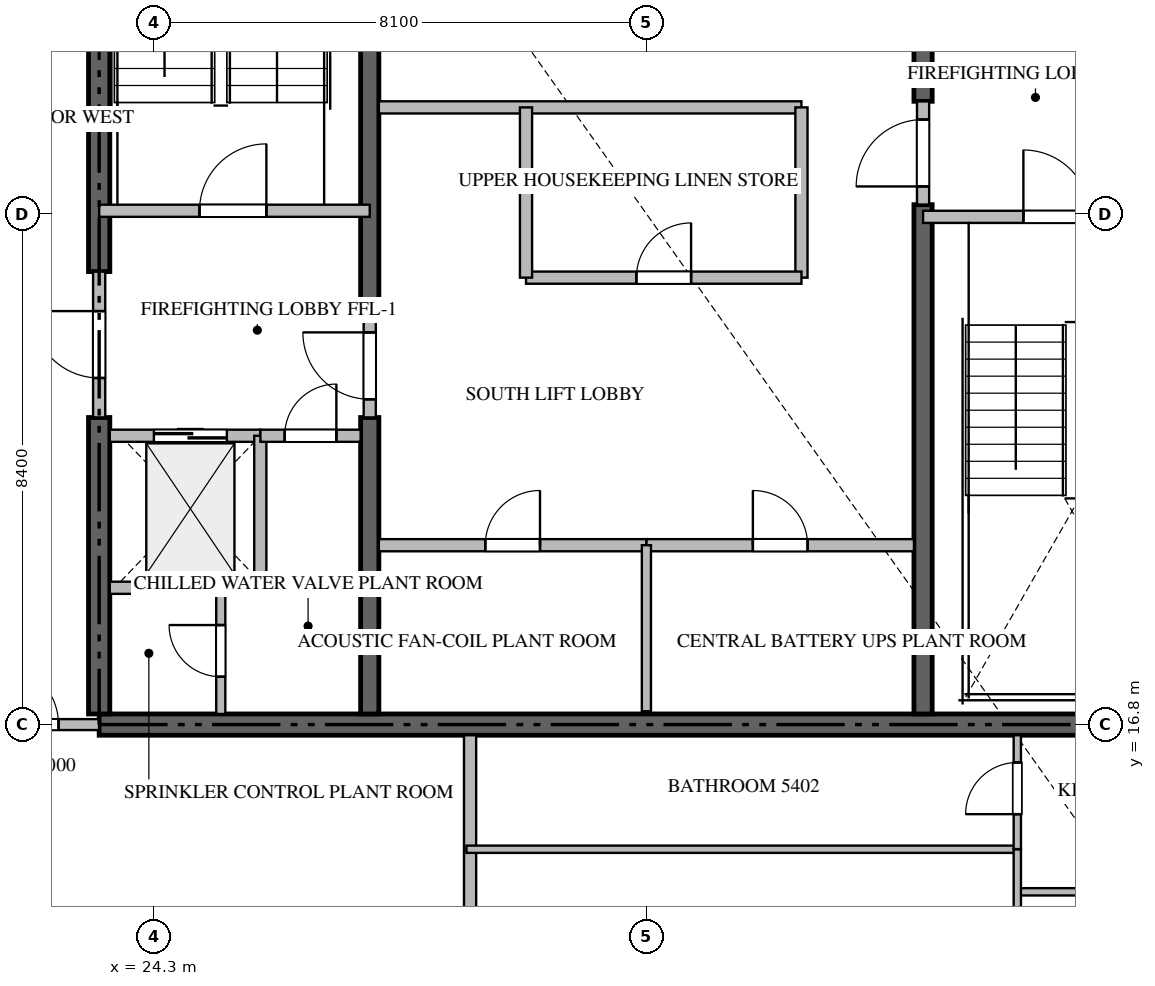
"""IFC4 building model, lengths in metres.
Left out: names, types, materials, properties, quantities, classifications, styles, units other than length and angle.
Written with IfcOpenShell. Run it as: python <this file> out.ifc"""

import sys

from ifc_helpers import new_model, si_unit, direction, frame, frame_2d, origin, place, context, subcontext, project, spatial, rectangle, extrude, source, transform, mapped, element, fill, save


model = new_model("IFC4")
c1 = context("Model", 3, precision=1e-05, world=origin(), true_north=direction((0.0, 1.0)))
c2 = subcontext(c1, "Body", "Model", "MODEL_VIEW")
j1 = project(units=[si_unit("LENGTHUNIT", "METRE"), si_unit("PLANEANGLEUNIT", "RADIAN")], contexts=[c1])
p1 = place(None, origin())
s1 = spatial("IfcSite", under=j1, at=p1, CompositionType="ELEMENT")
p2 = place(p1, origin())
s2 = spatial("IfcBuilding", under=s1, at=p2, CompositionType="ELEMENT")
p3 = place(p2, frame((0.0, 0.0, 218.15)))
s3 = spatial("IfcBuildingStorey", under=s2, at=p3, CompositionType="ELEMENT", Elevation=218.15)
p4 = place(p3, frame((23.4, 16.8, -0.26), z_axis=(0.0, 0.0, 1.0), x_axis=(1.0, 0.0, 0.0)))
e1 = element("IfcWall", 1, at=p4, inside=s3, PredefinedType="SHEAR", context=c2, shape_type="SweptSolid", body=[
    extrude(rectangle(XDim=18.0, YDim=0.35, at=frame_2d((9.0, 0.0))), origin(), (0.0, 0.0, 1.0), 3.848),
])
p5 = place(p3, frame((23.4, 16.975, -0.26), z_axis=(0.0, 0.0, 1.0), x_axis=(0.0, 1.0, 0.0)))
e2 = element("IfcWall", 2, at=p5, inside=s3, PredefinedType="SHEAR", context=c2, shape_type="SweptSolid", body=[
    extrude(rectangle(XDim=4.875, YDim=0.35, at=frame_2d((2.438, 0.0))), origin(), (0.0, 0.0, 1.0), 3.848),
])
p6 = place(p3, frame((23.4, 24.25, -0.26), z_axis=(0.0, 0.0, 1.0), x_axis=(0.0, 1.0, 0.0)))
e3 = element("IfcWall", 3, at=p6, inside=s3, PredefinedType="SHEAR", context=c2, shape_type="SweptSolid", body=[
    extrude(rectangle(XDim=9.175, YDim=0.35, at=frame_2d((4.587, 0.0))), origin(), (0.0, 0.0, 1.0), 3.848),
])
p7 = place(p3, frame((27.85, 16.975, -0.26), z_axis=(0.0, 0.0, 1.0), x_axis=(0.0, 1.0, 0.0)))
e4 = element("IfcWall", 4, at=p7, inside=s3, PredefinedType="SHEAR", context=c2, shape_type="SweptSolid", body=[
    extrude(rectangle(XDim=4.875, YDim=0.3, at=frame_2d((2.438, 0.0))), origin(), (0.0, 0.0, 1.0), 3.848),
])
p8 = place(p3, frame((27.85, 23.55, -0.26), z_axis=(0.0, 0.0, 1.0), x_axis=(0.0, 1.0, 0.0)))
e5 = element("IfcWall", 5, at=p8, inside=s3, PredefinedType="SHEAR", context=c2, shape_type="SweptSolid", body=[
    extrude(rectangle(XDim=9.875, YDim=0.3, at=frame_2d((4.938, 0.0))), origin(), (0.0, 0.0, 1.0), 3.848),
])
p9 = place(p3, frame((36.95, 16.975, -0.26), z_axis=(0.0, 0.0, 1.0), x_axis=(0.0, 1.0, 0.0)))
e6 = element("IfcWall", 6, at=p9, inside=s3, PredefinedType="SHEAR", context=c2, shape_type="SweptSolid", body=[
    extrude(rectangle(XDim=8.375, YDim=0.3, at=frame_2d((4.188, 0.0))), origin(), (0.0, 0.0, 1.0), 3.848),
])
p10 = place(p3, frame((36.95, 27.05, -0.26), z_axis=(0.0, 0.0, 1.0), x_axis=(0.0, 1.0, 0.0)))
e7 = element("IfcWall", 7, at=p10, inside=s3, PredefinedType="SHEAR", context=c2, shape_type="SweptSolid", body=[
    extrude(rectangle(XDim=6.375, YDim=0.3, at=frame_2d((3.188, 0.0))), origin(), (0.0, 0.0, 1.0), 3.848),
])
p11 = place(p3, frame((23.4, 25.25, 0.0), z_axis=(0.0, 0.0, 1.0), x_axis=(1.0, 0.0, 0.0)))
e8 = element("IfcWall", 8, at=p11, inside=s3, PredefinedType="STANDARD", context=c2, shape_type="SweptSolid", body=[
    extrude(rectangle(XDim=4.45, YDim=0.2, at=frame_2d((2.225, 0.0))), origin(), (0.0, 0.0, 1.0), 3.59),
])
p12 = place(p11, frame((1.65, 0.0, 0.0)))
e9 = element("IfcOpeningElement", 9, at=p12, cuts=e8, PredefinedType="OPENING", context=c2, shape_type="SweptSolid", body=[
    extrude(rectangle(XDim=1.1, YDim=2.15, at=frame_2d((0.55, 1.075))), frame((0.0, 0.11, 0.0), z_axis=(0.0, -1.0, 0.0), x_axis=(1.0, 0.0, 0.0)), (0.0, 0.0, 1.0), 0.22),
])
p13 = place(p3, frame((36.95, 25.15, 0.0), z_axis=(0.0, 0.0, 1.0), x_axis=(1.0, 0.0, 0.0)))
e10 = element("IfcWall", 10, at=p13, inside=s3, PredefinedType="STANDARD", context=c2, shape_type="SweptSolid", body=[
    extrude(rectangle(XDim=4.45, YDim=0.2, at=frame_2d((2.225, 0.0))), origin(), (0.0, 0.0, 1.0), 3.59),
])
p14 = place(p13, frame((1.65, 0.0, 0.0)))
e11 = element("IfcOpeningElement", 11, at=p14, cuts=e10, PredefinedType="OPENING", context=c2, shape_type="SweptSolid", body=[
    extrude(rectangle(XDim=1.1, YDim=2.15, at=frame_2d((0.55, 1.075))), frame((0.0, 0.11, 0.0), z_axis=(0.0, -1.0, 0.0), x_axis=(1.0, 0.0, 0.0)), (0.0, 0.0, 1.0), 0.22),
])
p15 = place(p3, frame((23.575, 21.55, 0.0), z_axis=(0.0, 0.0, 1.0), x_axis=(1.0, 0.0, 0.0)))
e12 = element("IfcWall", 12, at=p15, inside=s3, PredefinedType="STANDARD", context=c2, shape_type="SweptSolid", body=[
    extrude(rectangle(XDim=2.475, YDim=0.2, at=frame_2d((1.238, 0.0))), origin(), (0.0, 0.0, 1.0), 3.59),
])
p16 = place(p15, frame((0.725, 0.0, 0.0)))
e13 = element("IfcOpeningElement", 13, at=p16, cuts=e12, PredefinedType="OPENING", context=c2, shape_type="SweptSolid", body=[
    extrude(rectangle(XDim=1.2, YDim=2.2, at=frame_2d((0.6, 1.1))), frame((0.0, 0.11, 0.0), z_axis=(0.0, -1.0, 0.0), x_axis=(1.0, 0.0, 0.0)), (0.0, 0.0, 1.0), 0.22),
])
p17 = place(p3, frame((26.05, 19.05, 0.0), z_axis=(0.0, 0.0, 1.0), x_axis=(0.0, 1.0, 0.0)))
e14 = element("IfcWall", 14, at=p17, inside=s3, PredefinedType="STANDARD", context=c2, shape_type="SweptSolid", body=[
    extrude(rectangle(XDim=2.5, YDim=0.2, at=frame_2d((1.25, 0.0))), origin(), (0.0, 0.0, 1.0), 3.59),
])
p18 = place(p3, frame((23.575, 19.05, 0.0), z_axis=(0.0, 0.0, 1.0), x_axis=(1.0, 0.0, 0.0)))
e15 = element("IfcWall", 15, at=p18, inside=s3, PredefinedType="STANDARD", context=c2, shape_type="SweptSolid", body=[
    extrude(rectangle(XDim=2.475, YDim=0.2, at=frame_2d((1.238, 0.0))), origin(), (0.0, 0.0, 1.0), 3.59),
])
p19 = place(p3, frame((26.052, 21.55, 0.0), z_axis=(0.0, 0.0, 1.0), x_axis=(1.0, 0.0, 0.0)))
e16 = element("IfcWall", 16, at=p19, inside=s3, PredefinedType="STANDARD", context=c2, shape_type="SweptSolid", body=[
    extrude(rectangle(XDim=1.648, YDim=0.2, at=frame_2d((0.824, 0.0))), origin(), (0.0, 0.0, 1.0), 3.59),
])
p20 = place(p19, frame((0.399, 0.0, 0.0)))
e17 = element("IfcOpeningElement", 17, at=p20, cuts=e16, PredefinedType="OPENING", context=c2, shape_type="SweptSolid", body=[
    extrude(rectangle(XDim=0.85, YDim=2.1, at=frame_2d((0.425, 1.05))), frame((0.0, 0.11, 0.0), z_axis=(0.0, -1.0, 0.0), x_axis=(1.0, 0.0, 0.0)), (0.0, 0.0, 1.0), 0.22),
])
p21 = place(p3, frame((23.4, 21.852, 0.0), z_axis=(0.0, 0.0, 1.0), x_axis=(0.0, 1.0, 0.0)))
e18 = element("IfcWall", 18, at=p21, inside=s3, PredefinedType="STANDARD", context=c2, shape_type="SweptSolid", body=[
    extrude(rectangle(XDim=2.396, YDim=0.2, at=frame_2d((1.198, 0.0))), origin(), (0.0, 0.0, 1.0), 3.59),
])
p22 = place(p21, frame((0.648, 0.0, 0.0)))
e19 = element("IfcOpeningElement", 19, at=p22, cuts=e18, PredefinedType="OPENING", context=c2, shape_type="SweptSolid", body=[
    extrude(rectangle(XDim=1.1, YDim=2.15, at=frame_2d((0.55, 1.075))), frame((0.0, 0.11, 0.0), z_axis=(0.0, -1.0, 0.0), x_axis=(1.0, 0.0, 0.0)), (0.0, 0.0, 1.0), 0.22),
])
p23 = place(p3, frame((27.85, 21.852, 0.0), z_axis=(0.0, 0.0, 1.0), x_axis=(0.0, 1.0, 0.0)))
e20 = element("IfcWall", 20, at=p23, inside=s3, PredefinedType="STANDARD", context=c2, shape_type="SweptSolid", body=[
    extrude(rectangle(XDim=1.696, YDim=0.2, at=frame_2d((0.848, 0.0))), origin(), (0.0, 0.0, 1.0), 3.59),
])
p24 = place(p23, frame((0.298, 0.0, 0.0)))
e21 = element("IfcOpeningElement", 21, at=p24, cuts=e20, PredefinedType="OPENING", context=c2, shape_type="SweptSolid", body=[
    extrude(rectangle(XDim=1.1, YDim=2.15, at=frame_2d((0.55, 1.075))), frame((0.0, 0.11, 0.0), z_axis=(0.0, -1.0, 0.0), x_axis=(1.0, 0.0, 0.0)), (0.0, 0.0, 1.0), 0.22),
])
p25 = place(p3, frame((36.95, 25.352, 0.0), z_axis=(0.0, 0.0, 1.0), x_axis=(0.0, 1.0, 0.0)))
e22 = element("IfcWall", 22, at=p25, inside=s3, PredefinedType="STANDARD", context=c2, shape_type="SweptSolid", body=[
    extrude(rectangle(XDim=1.696, YDim=0.2, at=frame_2d((0.848, 0.0))), origin(), (0.0, 0.0, 1.0), 3.59),
])
p26 = place(p25, frame((0.298, 0.0, 0.0)))
e23 = element("IfcOpeningElement", 23, at=p26, cuts=e22, PredefinedType="OPENING", context=c2, shape_type="SweptSolid", body=[
    extrude(rectangle(XDim=1.1, YDim=2.15, at=frame_2d((0.55, 1.075))), frame((0.0, 0.11, 0.0), z_axis=(0.0, -1.0, 0.0), x_axis=(1.0, 0.0, 0.0)), (0.0, 0.0, 1.0), 0.22),
])
p27 = place(p3, frame((25.4, 16.975, 0.0), z_axis=(0.0, 0.0, 1.0), x_axis=(0.0, 1.0, 0.0)))
e24 = element("IfcWall", 24, at=p27, inside=s3, PredefinedType="PARTITIONING", context=c2, shape_type="SweptSolid", body=[
    extrude(rectangle(XDim=2.075, YDim=0.15, at=frame_2d((1.038, 0.0))), origin(), (0.0, 0.0, 1.0), 3.59),
])
p28 = place(p27, frame((0.612, 0.0, 0.0)))
e25 = element("IfcOpeningElement", 25, at=p28, cuts=e24, PredefinedType="OPENING", context=c2, shape_type="SweptSolid", body=[
    extrude(rectangle(XDim=0.85, YDim=2.1, at=frame_2d((0.425, 1.05))), frame((0.0, 0.085, 0.0), z_axis=(0.0, -1.0, 0.0), x_axis=(1.0, 0.0, 0.0)), (0.0, 0.0, 1.0), 0.17),
])
p29 = place(p3, frame((28.0, 19.75, 0.0), z_axis=(0.0, 0.0, 1.0), x_axis=(1.0, 0.0, 0.0)))
e26 = element("IfcWall", 26, at=p29, inside=s3, PredefinedType="STANDARD", context=c2, shape_type="SweptSolid", body=[
    extrude(rectangle(XDim=4.4, YDim=0.2, at=frame_2d((2.2, 0.0))), origin(), (0.0, 0.0, 1.0), 3.59),
])
p30 = place(p29, frame((1.75, 0.0, 0.0)))
e27 = element("IfcOpeningElement", 27, at=p30, cuts=e26, PredefinedType="OPENING", context=c2, shape_type="SweptSolid", body=[
    extrude(rectangle(XDim=0.9, YDim=2.1, at=frame_2d((0.45, 1.05))), frame((0.0, 0.11, 0.0), z_axis=(0.0, -1.0, 0.0), x_axis=(1.0, 0.0, 0.0)), (0.0, 0.0, 1.0), 0.22),
])
p31 = place(p3, frame((32.402, 19.75, 0.0), z_axis=(0.0, 0.0, 1.0), x_axis=(1.0, 0.0, 0.0)))
e28 = element("IfcWall", 28, at=p31, inside=s3, PredefinedType="STANDARD", context=c2, shape_type="SweptSolid", body=[
    extrude(rectangle(XDim=4.398, YDim=0.2, at=frame_2d((2.199, 0.0))), origin(), (0.0, 0.0, 1.0), 3.59),
])
p32 = place(p31, frame((1.749, 0.0, 0.0)))
e29 = element("IfcOpeningElement", 29, at=p32, cuts=e28, PredefinedType="OPENING", context=c2, shape_type="SweptSolid", body=[
    extrude(rectangle(XDim=0.9, YDim=2.1, at=frame_2d((0.45, 1.05))), frame((0.0, 0.11, 0.0), z_axis=(0.0, -1.0, 0.0), x_axis=(1.0, 0.0, 0.0)), (0.0, 0.0, 1.0), 0.22),
])
p33 = place(p3, frame((32.4, 17.02, 0.0), z_axis=(0.0, 0.0, 1.0), x_axis=(0.0, 1.0, 0.0)))
e30 = element("IfcWall", 30, at=p33, inside=s3, PredefinedType="PARTITIONING", context=c2, shape_type="SweptSolid", body=[
    extrude(rectangle(XDim=2.73, YDim=0.15, at=frame_2d((1.365, 0.0))), origin(), (0.0, 0.0, 1.0), 3.59),
])
p34 = place(p3, frame((28.0, 26.95, 0.0), z_axis=(0.0, 0.0, 1.0), x_axis=(1.0, 0.0, 0.0)))
e31 = element("IfcWall", 31, at=p34, inside=s3, PredefinedType="STANDARD", context=c2, shape_type="SweptSolid", body=[
    extrude(rectangle(XDim=6.95, YDim=0.2, at=frame_2d((3.475, 0.0))), origin(), (0.0, 0.0, 1.0), 3.59),
])
p35 = place(p3, frame((34.95, 24.15, 0.0), z_axis=(0.0, 0.0, 1.0), x_axis=(0.0, 1.0, 0.0)))
e32 = element("IfcWall", 32, at=p35, inside=s3, PredefinedType="STANDARD", context=c2, shape_type="SweptSolid", body=[
    extrude(rectangle(XDim=2.8, YDim=0.2, at=frame_2d((1.4, 0.0))), origin(), (0.0, 0.0, 1.0), 3.59),
])
p36 = place(p3, frame((30.42, 24.15, 0.0), z_axis=(0.0, 0.0, 1.0), x_axis=(1.0, 0.0, 0.0)))
e33 = element("IfcWall", 33, at=p36, inside=s3, PredefinedType="STANDARD", context=c2, shape_type="SweptSolid", body=[
    extrude(rectangle(XDim=4.53, YDim=0.2, at=frame_2d((2.265, 0.0))), origin(), (0.0, 0.0, 1.0), 3.59),
])
p37 = place(p36, frame((1.815, 0.0, 0.0)))
e34 = element("IfcOpeningElement", 34, at=p37, cuts=e33, PredefinedType="OPENING", context=c2, shape_type="SweptSolid", body=[
    extrude(rectangle(XDim=0.9, YDim=2.1, at=frame_2d((0.45, 1.05))), frame((0.0, 0.11, 0.0), z_axis=(0.0, -1.0, 0.0), x_axis=(1.0, 0.0, 0.0)), (0.0, 0.0, 1.0), 0.22),
])
p38 = place(p3, frame((30.42, 24.15, 0.0), z_axis=(0.0, 0.0, 1.0), x_axis=(0.0, 1.0, 0.0)))
e35 = element("IfcWall", 35, at=p38, inside=s3, PredefinedType="STANDARD", context=c2, shape_type="SweptSolid", body=[
    extrude(rectangle(XDim=2.8, YDim=0.2, at=frame_2d((1.4, 0.0))), origin(), (0.0, 0.0, 1.0), 3.59),
])
p39 = place(p3, frame((29.5, 1.282, 0.0), z_axis=(0.0, 0.0, 1.0), x_axis=(0.0, 1.0, 0.0)))
e36 = element("IfcWall", 36, at=p39, inside=s3, PredefinedType="PARTITIONING", context=c2, shape_type="SweptSolid", body=[
    extrude(rectangle(XDim=15.343, YDim=0.2, at=frame_2d((7.671, 0.0))), origin(), (0.0, 0.0, 1.0), 3.59),
])
p40 = place(p3, frame((20.902, 16.8, 0.0), z_axis=(0.0, 0.0, 1.0), x_axis=(1.0, 0.0, 0.0)))
e37 = element("IfcWall", 37, at=p40, inside=s3, PredefinedType="PARTITIONING", context=c2, shape_type="SweptSolid", body=[
    extrude(rectangle(XDim=2.496, YDim=0.18, at=frame_2d((1.248, 0.0))), origin(), (0.0, 0.0, 1.0), 3.59),
])
p41 = place(p40, frame((0.83, 0.0, 0.0)))
e38 = element("IfcOpeningElement", 38, at=p41, cuts=e37, PredefinedType="OPENING", context=c2, shape_type="SweptSolid", body=[
    extrude(rectangle(XDim=1.0, YDim=2.15, at=frame_2d((0.5, 1.075))), frame((0.0, 0.1, 0.0), z_axis=(0.0, -1.0, 0.0), x_axis=(1.0, 0.0, 0.0)), (0.0, 0.0, 1.0), 0.2),
])
p42 = place(p3, frame((38.5, 14.05, 0.0), z_axis=(0.0, 0.0, 1.0), x_axis=(1.0, 0.0, 0.0)))
e39 = element("IfcWall", 39, at=p42, inside=s3, PredefinedType="PARTITIONING", context=c2, shape_type="SweptSolid", body=[
    extrude(rectangle(XDim=2.85, YDim=0.12, at=frame_2d((1.425, 0.0))), origin(), (0.0, 0.0, 1.0), 3.59),
])
p43 = place(p42, frame((1.0, 0.0, 0.0)))
e40 = element("IfcOpeningElement", 40, at=p43, cuts=e39, PredefinedType="OPENING", context=c2, shape_type="SweptSolid", body=[
    extrude(rectangle(XDim=0.85, YDim=2.1, at=frame_2d((0.425, 1.05))), frame((0.0, 0.07, 0.0), z_axis=(0.0, -1.0, 0.0), x_axis=(1.0, 0.0, 0.0)), (0.0, 0.0, 1.0), 0.14),
])
p44 = place(p3, frame((29.44, 14.75, 0.0), z_axis=(0.0, 0.0, 1.0), x_axis=(1.0, 0.0, 0.0)))
e41 = element("IfcWall", 41, at=p44, inside=s3, PredefinedType="PARTITIONING", context=c2, shape_type="SweptSolid", body=[
    extrude(rectangle(XDim=9.06, YDim=0.12, at=frame_2d((4.53, 0.0))), origin(), (0.0, 0.0, 1.0), 3.59),
])
p45 = place(p3, frame((38.5, 6.024, 0.0), z_axis=(0.0, 0.0, 1.0), x_axis=(0.0, 1.0, 0.0)))
e42 = element("IfcWall", 42, at=p45, inside=s3, PredefinedType="PARTITIONING", context=c2, shape_type="SweptSolid", body=[
    extrude(rectangle(XDim=8.726, YDim=0.12, at=frame_2d((4.363, 0.0))), origin(), (0.0, 0.0, 1.0), 3.59),
])
p46 = place(p45, frame((3.938, 0.0, 0.0)))
e43 = element("IfcOpeningElement", 43, at=p46, cuts=e42, PredefinedType="OPENING", context=c2, shape_type="SweptSolid", body=[
    extrude(rectangle(XDim=0.85, YDim=2.1, at=frame_2d((0.425, 1.05))), frame((0.0, 0.07, 0.0), z_axis=(0.0, -1.0, 0.0), x_axis=(1.0, 0.0, 0.0)), (0.0, 0.0, 1.0), 0.14),
])
p47 = place(p3, frame((38.5, 14.752, 0.0), z_axis=(0.0, 0.0, 1.0), x_axis=(0.0, 1.0, 0.0)))
e44 = element("IfcWall", 44, at=p47, inside=s3, PredefinedType="PARTITIONING", context=c2, shape_type="SweptSolid", body=[
    extrude(rectangle(XDim=1.873, YDim=0.12, at=frame_2d((0.937, 0.0))), origin(), (0.0, 0.0, 1.0), 3.59),
])
p48 = place(p47, frame((0.575, 0.0, 0.0)))
e45 = element("IfcOpeningElement", 45, at=p48, cuts=e44, PredefinedType="OPENING", context=c2, shape_type="SweptSolid", body=[
    extrude(rectangle(XDim=0.85, YDim=2.1, at=frame_2d((0.425, 1.05))), frame((0.0, 0.07, 0.0), z_axis=(0.0, -1.0, 0.0), x_axis=(1.0, 0.0, 0.0)), (0.0, 0.0, 1.0), 0.14),
])
m1 = source(origin(), c2, "Body", "SweptSolid", [
    extrude(rectangle(XDim=1.1, YDim=2.15, at=frame_2d((0.55, 1.075))), frame((0.0, 0.025, 0.0), z_axis=(0.0, -1.0, 0.0), x_axis=(1.0, 0.0, 0.0)), (0.0, 0.0, 1.0), 0.05),
])
p49 = place(p12, origin())
e46 = element("IfcDoor", 46, at=p49, inside=s3, OperationType="SINGLE_SWING_RIGHT", PredefinedType="DOOR", context=c2, shape_type="MappedRepresentation", body=[
    mapped(m1, transform((0.0, 0.0, 0.0), scale=1.0)),
])
fill(e9, e46)
p50 = place(p14, origin())
e47 = element("IfcDoor", 47, at=p50, inside=s3, OperationType="SINGLE_SWING_LEFT", PredefinedType="DOOR", context=c2, shape_type="MappedRepresentation", body=[
    mapped(m1, transform((0.0, 0.0, 0.0), scale=1.0)),
])
fill(e11, e47)
m2 = source(origin(), c2, "Body", "SweptSolid", [
    extrude(rectangle(XDim=1.2, YDim=2.2, at=frame_2d((0.6, 1.1))), frame((0.0, 0.025, 0.0), z_axis=(0.0, -1.0, 0.0), x_axis=(1.0, 0.0, 0.0)), (0.0, 0.0, 1.0), 0.05),
])
p51 = place(p16, origin())
e48 = element("IfcDoor", 48, at=p51, inside=s3, OperationType="DOUBLE_DOOR_SLIDING", PredefinedType="DOOR", context=c2, shape_type="MappedRepresentation", body=[
    mapped(m2, transform((0.0, 0.0, 0.0), scale=1.0)),
])
fill(e13, e48)
m3 = source(origin(), c2, "Body", "SweptSolid", [
    extrude(rectangle(XDim=0.85, YDim=2.1, at=frame_2d((0.425, 1.05))), frame((0.0, 0.025, 0.0), z_axis=(0.0, -1.0, 0.0), x_axis=(1.0, 0.0, 0.0)), (0.0, 0.0, 1.0), 0.05),
])
p52 = place(p20, origin())
e49 = element("IfcDoor", 49, at=p52, inside=s3, OperationType="SINGLE_SWING_RIGHT", PredefinedType="DOOR", context=c2, shape_type="MappedRepresentation", body=[
    mapped(m3, transform((0.0, 0.0, 0.0), scale=1.0)),
])
fill(e17, e49)
p53 = place(p22, origin())
e50 = element("IfcDoor", 50, at=p53, inside=s3, OperationType="SINGLE_SWING_RIGHT", PredefinedType="DOOR", context=c2, shape_type="MappedRepresentation", body=[
    mapped(m1, transform((0.0, 0.0, 0.0), scale=1.0)),
])
fill(e19, e50)
p54 = place(p24, origin())
e51 = element("IfcDoor", 51, at=p54, inside=s3, OperationType="SINGLE_SWING_RIGHT", PredefinedType="DOOR", context=c2, shape_type="MappedRepresentation", body=[
    mapped(m1, transform((0.0, 0.0, 0.0), scale=1.0)),
])
fill(e21, e51)
p55 = place(p26, origin())
e52 = element("IfcDoor", 52, at=p55, inside=s3, OperationType="SINGLE_SWING_LEFT", PredefinedType="DOOR", context=c2, shape_type="MappedRepresentation", body=[
    mapped(m1, transform((0.0, 0.0, 0.0), scale=1.0)),
])
fill(e23, e52)
p56 = place(p28, origin())
e53 = element("IfcDoor", 53, at=p56, inside=s3, OperationType="SINGLE_SWING_RIGHT", PredefinedType="DOOR", context=c2, shape_type="MappedRepresentation", body=[
    mapped(m3, transform((0.0, 0.0, 0.0), scale=1.0)),
])
fill(e25, e53)
m4 = source(origin(), c2, "Body", "SweptSolid", [
    extrude(rectangle(XDim=0.9, YDim=2.1, at=frame_2d((0.45, 1.05))), frame((0.0, 0.025, 0.0), z_axis=(0.0, -1.0, 0.0), x_axis=(1.0, 0.0, 0.0)), (0.0, 0.0, 1.0), 0.05),
])
p57 = place(p30, origin())
e54 = element("IfcDoor", 54, at=p57, inside=s3, OperationType="SINGLE_SWING_RIGHT", PredefinedType="DOOR", context=c2, shape_type="MappedRepresentation", body=[
    mapped(m4, transform((0.0, 0.0, 0.0), scale=1.0)),
])
fill(e27, e54)
p58 = place(p32, origin())
e55 = element("IfcDoor", 55, at=p58, inside=s3, OperationType="SINGLE_SWING_LEFT", PredefinedType="DOOR", context=c2, shape_type="MappedRepresentation", body=[
    mapped(m4, transform((0.0, 0.0, 0.0), scale=1.0)),
])
fill(e29, e55)
p59 = place(p37, origin())
e56 = element("IfcDoor", 56, at=p59, inside=s3, OperationType="SINGLE_SWING_RIGHT", PredefinedType="DOOR", context=c2, shape_type="MappedRepresentation", body=[
    mapped(m4, transform((0.0, 0.0, 0.0), scale=1.0)),
])
fill(e34, e56)
m5 = source(origin(), c2, "Body", "SweptSolid", [
    extrude(rectangle(XDim=1.0, YDim=2.15, at=frame_2d((0.5, 1.075))), frame((0.0, 0.025, 0.0), z_axis=(0.0, -1.0, 0.0), x_axis=(1.0, 0.0, 0.0)), (0.0, 0.0, 1.0), 0.05),
])
p60 = place(p41, origin())
e57 = element("IfcDoor", 57, at=p60, inside=s3, OperationType="SINGLE_SWING_LEFT", PredefinedType="DOOR", context=c2, shape_type="MappedRepresentation", body=[
    mapped(m5, transform((0.0, 0.0, 0.0), scale=1.0)),
])
fill(e38, e57)
p61 = place(p48, origin())
e58 = element("IfcDoor", 58, at=p61, inside=s3, OperationType="SINGLE_SWING_LEFT", PredefinedType="DOOR", context=c2, shape_type="MappedRepresentation", body=[
    mapped(m3, transform((0.0, 0.0, 0.0), scale=1.0)),
])
fill(e45, e58)
save(model, sys.argv[1])
